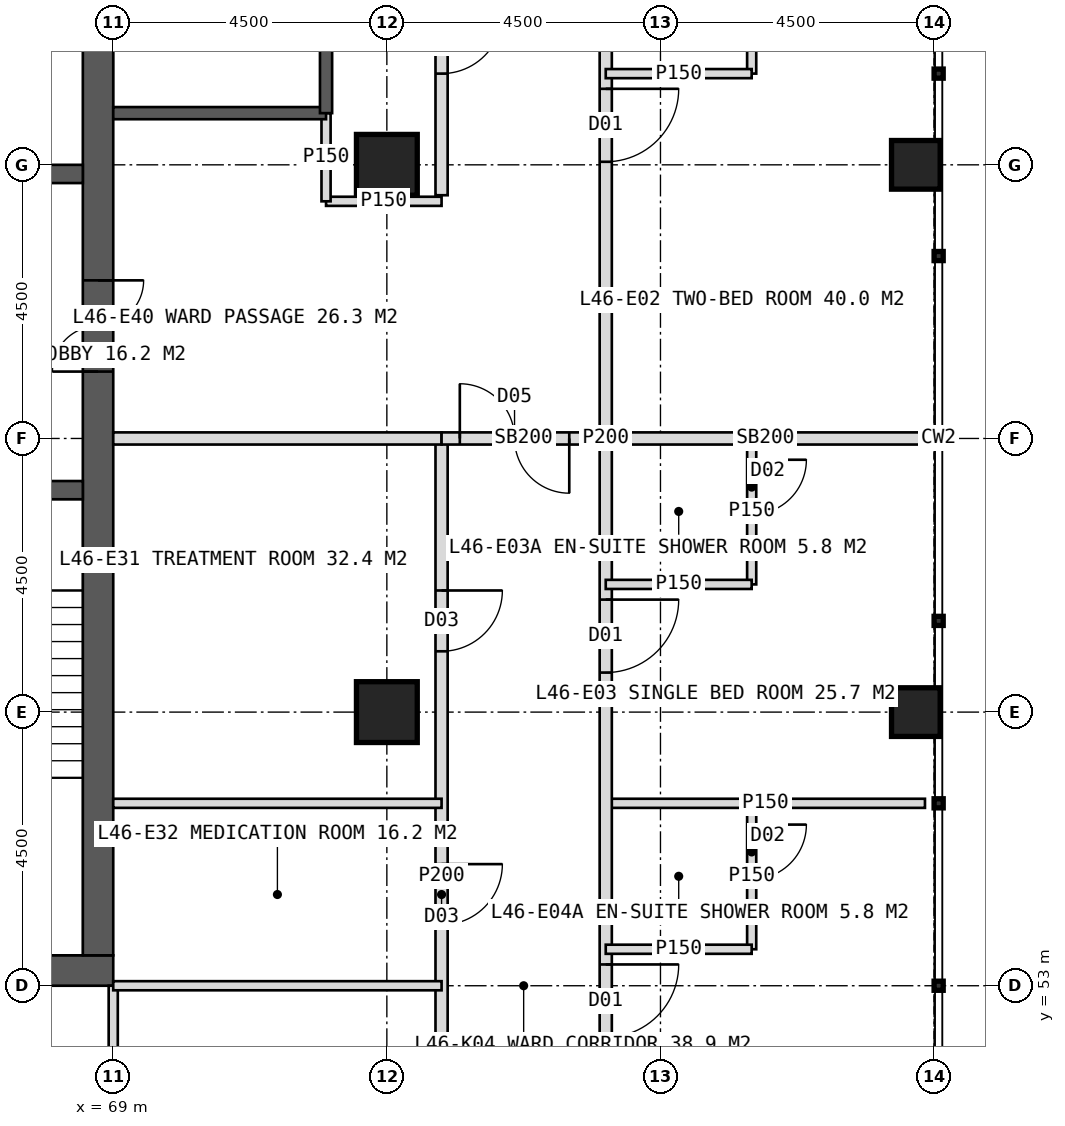
"""IFC4 building model, lengths in metres.
Left out: names, types, materials, properties, quantities, classifications, styles, units other than length and angle.
Written with IfcOpenShell. Run it as: python <this file> out.ifc"""

import sys

from ifc_helpers import new_model, si_unit, direction, frame, frame_2d, origin, origin_2d, place, context, subcontext, project, spatial, rectangle, hollow_rectangle, extrude, element, fill, save


model = new_model("IFC4")
c1 = context("Model", 3, precision=1e-05, world=origin(), true_north=direction((0.0, 1.0)))
c2 = subcontext(c1, "Body", "Model", "MODEL_VIEW")
j1 = project(units=[si_unit("LENGTHUNIT", "METRE"), si_unit("PLANEANGLEUNIT", "RADIAN")], contexts=[c1])
p1 = place(None, origin())
s1 = spatial("IfcSite", under=j1, at=p1, CompositionType="ELEMENT")
p2 = place(p1, origin())
s2 = spatial("IfcBuilding", under=s1, at=p2, CompositionType="ELEMENT")
p3 = place(p2, frame((0.0, 0.0, 193.0)))
s3 = spatial("IfcBuildingStorey", under=s2, at=p3, CompositionType="ELEMENT", Elevation=193.0)
p4 = place(p3, frame((51.0, 53.25, 0.0), z_axis=(0.0, 0.0, 1.0), x_axis=(1.0, 0.0, 0.0)))
e1 = element("IfcWall", 1, at=p4, inside=s3, PredefinedType="SHEAR", context=c2, shape_type="SweptSolid", body=[
    extrude(rectangle(XDim=18.0, YDim=0.5, at=frame_2d((9.0, 0.0))), origin(), (0.0, 0.0, 1.0), 4.0),
])
p5 = place(p4, frame((8.1, 0.0, 0.0)))
e2 = element("IfcOpeningElement", 2, at=p5, cuts=e1, PredefinedType="OPENING", context=c2, shape_type="SweptSolid", body=[
    extrude(rectangle(XDim=1.8, YDim=2.2, at=frame_2d((0.9, 1.1))), frame((0.0, 0.26, 0.0), z_axis=(0.0, -1.0, 0.0), x_axis=(1.0, 0.0, 0.0)), (0.0, 0.0, 1.0), 0.52),
])
p6 = place(p3, frame((68.75, 53.5, 0.0), z_axis=(0.0, 0.0, 1.0), x_axis=(0.0, 1.0, 0.0)))
e3 = element("IfcWall", 3, at=p6, inside=s3, PredefinedType="SHEAR", context=c2, shape_type="SweptSolid", body=[
    extrude(rectangle(XDim=17.0, YDim=0.5, at=frame_2d((8.5, 0.0))), origin(), (0.0, 0.0, 1.0), 4.0),
])
p7 = place(p6, frame((9.6, 0.0, 0.0)))
e4 = element("IfcOpeningElement", 4, at=p7, cuts=e3, PredefinedType="OPENING", context=c2, shape_type="SweptSolid", body=[
    extrude(rectangle(XDim=1.5, YDim=2.2, at=frame_2d((0.75, 1.1))), frame((0.0, 0.26, 0.0), z_axis=(0.0, -1.0, 0.0), x_axis=(1.0, 0.0, 0.0)), (0.0, 0.0, 1.0), 0.52),
])
p8 = place(p3, frame((65.2, 61.15, 0.0), z_axis=(0.0, 0.0, 1.0), x_axis=(1.0, 0.0, 0.0)))
e5 = element("IfcWall", 5, at=p8, inside=s3, PredefinedType="SHEAR", context=c2, shape_type="SweptSolid", body=[
    extrude(rectangle(XDim=3.3, YDim=0.3, at=frame_2d((1.65, 0.0))), origin(), (0.0, 0.0, 1.0), 4.0),
])
p9 = place(p8, frame((1.05, 0.0, 0.0)))
e6 = element("IfcOpeningElement", 6, at=p9, cuts=e5, PredefinedType="OPENING", context=c2, shape_type="SweptSolid", body=[
    extrude(rectangle(XDim=1.2, YDim=2.1, at=frame_2d((0.6, 1.05))), frame((0.0, 0.16, 0.0), z_axis=(0.0, -1.0, 0.0), x_axis=(1.0, 0.0, 0.0)), (0.0, 0.0, 1.0), 0.32),
])
p10 = place(p3, frame((65.2, 66.35, 0.0), z_axis=(0.0, 0.0, 1.0), x_axis=(1.0, 0.0, 0.0)))
e7 = element("IfcWall", 7, at=p10, inside=s3, PredefinedType="SHEAR", context=c2, shape_type="SweptSolid", body=[
    extrude(rectangle(XDim=3.3, YDim=0.3, at=frame_2d((1.65, 0.0))), origin(), (0.0, 0.0, 1.0), 4.0),
])
p11 = place(p10, frame((1.05, 0.0, 0.0)))
e8 = element("IfcOpeningElement", 8, at=p11, cuts=e7, PredefinedType="OPENING", context=c2, shape_type="SweptSolid", body=[
    extrude(rectangle(XDim=1.2, YDim=2.2, at=frame_2d((0.6, 1.1))), frame((0.0, 0.16, 0.0), z_axis=(0.0, -1.0, 0.0), x_axis=(1.0, 0.0, 0.0)), (0.0, 0.0, 1.0), 0.32),
])
for number, where, z_axis, x_axis in (
    (9, (73.5, 57.5, 0.0), (0.0, 0.0, 1.0), (1.0, 0.0, 0.0)),
    (10, (73.5, 66.5, 0.0), (0.0, 0.0, 1.0), (1.0, 0.0, 0.0)),
):
    element("IfcColumn", number, at=place(p3, frame(where, z_axis=z_axis, x_axis=x_axis)), inside=s3, PredefinedType="COLUMN", context=c2, shape_type="SweptSolid", body=[
        extrude(hollow_rectangle(XDim=1.0, YDim=1.0, WallThickness=0.1, at=origin_2d()), origin(), (0.0, 0.0, 1.0), 4.0),
    ])
for number, where, z_axis, x_axis in (
    (11, (82.2, 57.5, 0.0), (0.0, 0.0, 1.0), (1.0, 0.0, 0.0)),
    (12, (82.2, 66.5, 0.0), (0.0, 0.0, 1.0), (1.0, 0.0, 0.0)),
):
    element("IfcColumn", number, at=place(p3, frame(where, z_axis=z_axis, x_axis=x_axis)), inside=s3, PredefinedType="COLUMN", context=c2, shape_type="SweptSolid", body=[
        extrude(hollow_rectangle(XDim=0.8, YDim=0.8, WallThickness=0.08, at=origin_2d()), origin(), (0.0, 0.0, 1.0), 4.0),
    ])
p12 = place(p3, frame((69.0, 53.0, 0.0), z_axis=(0.0, 0.0, 1.0), x_axis=(0.0, -1.0, 0.0)))
e13 = element("IfcWall", 13, at=p12, inside=s3, PredefinedType="PARTITIONING", context=c2, shape_type="SweptSolid", body=[
    extrude(rectangle(XDim=5.4, YDim=0.15, at=frame_2d((2.7, 0.0))), origin(), (0.0, 0.0, 1.0), 3.75),
])
p13 = place(p3, frame((77.1, 62.0, 0.0), z_axis=(0.0, 0.0, 1.0), x_axis=(1.0, 0.0, 0.0)))
e14 = element("IfcWall", 14, at=p13, inside=s3, PredefinedType="SOLIDWALL", context=c2, shape_type="SweptSolid", body=[
    extrude(rectangle(XDim=5.25, YDim=0.2, at=frame_2d((2.625, 0.0))), origin(), (0.0, 0.0, 1.0), 2.95),
])
p14 = place(p3, frame((77.1, 56.0, 0.0), z_axis=(0.0, 0.0, 1.0), x_axis=(1.0, 0.0, 0.0)))
e15 = element("IfcWall", 15, at=p14, inside=s3, PredefinedType="PARTITIONING", context=c2, shape_type="SweptSolid", body=[
    extrude(rectangle(XDim=5.25, YDim=0.15, at=frame_2d((2.625, 0.0))), origin(), (0.0, 0.0, 1.0), 3.75),
])
p15 = place(p3, frame((77.1, 79.1, 0.0), z_axis=(0.0, 0.0, 1.0), x_axis=(0.0, -1.0, 0.0)))
e16 = element("IfcWall", 16, at=p15, inside=s3, PredefinedType="PARTITIONING", context=c2, shape_type="SweptSolid", body=[
    extrude(rectangle(XDim=34.2, YDim=0.2, at=frame_2d((17.1, 0.0))), origin(), (0.0, 0.0, 1.0), 3.75),
])
p16 = place(p15, frame((3.25, 0.0, 0.0)))
e17 = element("IfcOpeningElement", 17, at=p16, cuts=e16, PredefinedType="OPENING", context=c2, shape_type="SweptSolid", body=[
    extrude(rectangle(XDim=1.2, YDim=2.2, at=frame_2d((0.6, 1.1))), frame((0.0, 0.11, 0.0), z_axis=(0.0, -1.0, 0.0), x_axis=(1.0, 0.0, 0.0)), (0.0, 0.0, 1.0), 0.22),
])
p17 = place(p15, frame((11.35, 0.0, 0.0)))
e18 = element("IfcOpeningElement", 18, at=p17, cuts=e16, PredefinedType="OPENING", context=c2, shape_type="SweptSolid", body=[
    extrude(rectangle(XDim=1.2, YDim=2.2, at=frame_2d((0.6, 1.1))), frame((0.0, 0.11, 0.0), z_axis=(0.0, -1.0, 0.0), x_axis=(1.0, 0.0, 0.0)), (0.0, 0.0, 1.0), 0.22),
])
p18 = place(p15, frame((19.75, 0.0, 0.0)))
e19 = element("IfcOpeningElement", 19, at=p18, cuts=e16, PredefinedType="OPENING", context=c2, shape_type="SweptSolid", body=[
    extrude(rectangle(XDim=1.2, YDim=2.2, at=frame_2d((0.6, 1.1))), frame((0.0, 0.11, 0.0), z_axis=(0.0, -1.0, 0.0), x_axis=(1.0, 0.0, 0.0)), (0.0, 0.0, 1.0), 0.22),
])
p19 = place(p15, frame((25.75, 0.0, 0.0)))
e20 = element("IfcOpeningElement", 20, at=p19, cuts=e16, PredefinedType="OPENING", context=c2, shape_type="SweptSolid", body=[
    extrude(rectangle(XDim=1.2, YDim=2.2, at=frame_2d((0.6, 1.1))), frame((0.0, 0.11, 0.0), z_axis=(0.0, -1.0, 0.0), x_axis=(1.0, 0.0, 0.0)), (0.0, 0.0, 1.0), 0.22),
])
p20 = place(p3, frame((79.5, 71.0, 0.0), z_axis=(0.0, 0.0, 1.0), x_axis=(0.0, -1.0, 0.0)))
e21 = element("IfcWall", 21, at=p20, inside=s3, PredefinedType="PARTITIONING", context=c2, shape_type="SweptSolid", body=[
    extrude(rectangle(XDim=3.0, YDim=0.15, at=frame_2d((1.5, 0.0))), origin(), (0.0, 0.0, 1.0), 3.75),
])
p21 = place(p20, frame((0.35, 0.0, 0.0)))
e22 = element("IfcOpeningElement", 22, at=p21, cuts=e21, PredefinedType="OPENING", context=c2, shape_type="SweptSolid", body=[
    extrude(rectangle(XDim=0.9, YDim=2.1, at=frame_2d((0.45, 1.05))), frame((0.0, 0.085, 0.0), z_axis=(0.0, -1.0, 0.0), x_axis=(1.0, 0.0, 0.0)), (0.0, 0.0, 1.0), 0.17),
])
p22 = place(p3, frame((77.1, 68.0, 0.0), z_axis=(0.0, 0.0, 1.0), x_axis=(1.0, 0.0, 0.0)))
e23 = element("IfcWall", 23, at=p22, inside=s3, PredefinedType="PARTITIONING", context=c2, shape_type="SweptSolid", body=[
    extrude(rectangle(XDim=2.4, YDim=0.15, at=frame_2d((1.2, 0.0))), origin(), (0.0, 0.0, 1.0), 3.75),
])
p23 = place(p3, frame((79.5, 62.0, 0.0), z_axis=(0.0, 0.0, 1.0), x_axis=(0.0, -1.0, 0.0)))
e24 = element("IfcWall", 24, at=p23, inside=s3, PredefinedType="PARTITIONING", context=c2, shape_type="SweptSolid", body=[
    extrude(rectangle(XDim=2.4, YDim=0.15, at=frame_2d((1.2, 0.0))), origin(), (0.0, 0.0, 1.0), 3.75),
])
p24 = place(p23, frame((0.35, 0.0, 0.0)))
e25 = element("IfcOpeningElement", 25, at=p24, cuts=e24, PredefinedType="OPENING", context=c2, shape_type="SweptSolid", body=[
    extrude(rectangle(XDim=0.9, YDim=2.1, at=frame_2d((0.45, 1.05))), frame((0.0, 0.085, 0.0), z_axis=(0.0, -1.0, 0.0), x_axis=(1.0, 0.0, 0.0)), (0.0, 0.0, 1.0), 0.17),
])
p25 = place(p3, frame((77.1, 59.6, 0.0), z_axis=(0.0, 0.0, 1.0), x_axis=(1.0, 0.0, 0.0)))
e26 = element("IfcWall", 26, at=p25, inside=s3, PredefinedType="PARTITIONING", context=c2, shape_type="SweptSolid", body=[
    extrude(rectangle(XDim=2.4, YDim=0.15, at=frame_2d((1.2, 0.0))), origin(), (0.0, 0.0, 1.0), 3.75),
])
p26 = place(p3, frame((79.5, 56.0, 0.0), z_axis=(0.0, 0.0, 1.0), x_axis=(0.0, -1.0, 0.0)))
e27 = element("IfcWall", 27, at=p26, inside=s3, PredefinedType="PARTITIONING", context=c2, shape_type="SweptSolid", body=[
    extrude(rectangle(XDim=2.4, YDim=0.15, at=frame_2d((1.2, 0.0))), origin(), (0.0, 0.0, 1.0), 3.75),
])
p27 = place(p26, frame((0.35, 0.0, 0.0)))
e28 = element("IfcOpeningElement", 28, at=p27, cuts=e27, PredefinedType="OPENING", context=c2, shape_type="SweptSolid", body=[
    extrude(rectangle(XDim=0.9, YDim=2.1, at=frame_2d((0.45, 1.05))), frame((0.0, 0.085, 0.0), z_axis=(0.0, -1.0, 0.0), x_axis=(1.0, 0.0, 0.0)), (0.0, 0.0, 1.0), 0.17),
])
p28 = place(p3, frame((77.1, 53.6, 0.0), z_axis=(0.0, 0.0, 1.0), x_axis=(1.0, 0.0, 0.0)))
e29 = element("IfcWall", 29, at=p28, inside=s3, PredefinedType="PARTITIONING", context=c2, shape_type="SweptSolid", body=[
    extrude(rectangle(XDim=2.4, YDim=0.15, at=frame_2d((1.2, 0.0))), origin(), (0.0, 0.0, 1.0), 3.75),
])
p29 = place(p3, frame((74.4, 74.9, 0.0), z_axis=(0.0, 0.0, 1.0), x_axis=(0.0, -1.0, 0.0)))
e30 = element("IfcWall", 30, at=p29, inside=s3, PredefinedType="PARTITIONING", context=c2, shape_type="SweptSolid", body=[
    extrude(rectangle(XDim=8.9, YDim=0.2, at=frame_2d((4.45, 0.0))), origin(), (0.0, 0.0, 1.0), 3.75),
])
p30 = place(p29, frame((0.25, 0.0, 0.0)))
e31 = element("IfcOpeningElement", 31, at=p30, cuts=e30, PredefinedType="OPENING", context=c2, shape_type="SweptSolid", body=[
    extrude(rectangle(XDim=1.0, YDim=2.1, at=frame_2d((0.5, 1.05))), frame((0.0, 0.11, 0.0), z_axis=(0.0, -1.0, 0.0), x_axis=(1.0, 0.0, 0.0)), (0.0, 0.0, 1.0), 0.22),
])
p31 = place(p29, frame((5.9, 0.0, 0.0)))
e32 = element("IfcOpeningElement", 32, at=p31, cuts=e30, PredefinedType="OPENING", context=c2, shape_type="SweptSolid", body=[
    extrude(rectangle(XDim=1.0, YDim=2.1, at=frame_2d((0.5, 1.05))), frame((0.0, 0.11, 0.0), z_axis=(0.0, -1.0, 0.0), x_axis=(1.0, 0.0, 0.0)), (0.0, 0.0, 1.0), 0.22),
])
p32 = place(p3, frame((74.4, 62.0, 0.0), z_axis=(0.0, 0.0, 1.0), x_axis=(0.0, -1.0, 0.0)))
e33 = element("IfcWall", 33, at=p32, inside=s3, PredefinedType="PARTITIONING", context=c2, shape_type="SweptSolid", body=[
    extrude(rectangle(XDim=14.4, YDim=0.2, at=frame_2d((7.2, 0.0))), origin(), (0.0, 0.0, 1.0), 3.75),
])
p33 = place(p32, frame((2.5, 0.0, 0.0)))
e34 = element("IfcOpeningElement", 34, at=p33, cuts=e33, PredefinedType="OPENING", context=c2, shape_type="SweptSolid", body=[
    extrude(rectangle(XDim=1.0, YDim=2.1, at=frame_2d((0.5, 1.05))), frame((0.0, 0.11, 0.0), z_axis=(0.0, -1.0, 0.0), x_axis=(1.0, 0.0, 0.0)), (0.0, 0.0, 1.0), 0.22),
])
p34 = place(p32, frame((7.0, 0.0, 0.0)))
e35 = element("IfcOpeningElement", 35, at=p34, cuts=e33, PredefinedType="OPENING", context=c2, shape_type="SweptSolid", body=[
    extrude(rectangle(XDim=1.0, YDim=2.1, at=frame_2d((0.5, 1.05))), frame((0.0, 0.11, 0.0), z_axis=(0.0, -1.0, 0.0), x_axis=(1.0, 0.0, 0.0)), (0.0, 0.0, 1.0), 0.22),
])
p35 = place(p32, frame((11.2, 0.0, 0.0)))
e36 = element("IfcOpeningElement", 36, at=p35, cuts=e33, PredefinedType="OPENING", context=c2, shape_type="SweptSolid", body=[
    extrude(rectangle(XDim=1.0, YDim=2.1, at=frame_2d((0.5, 1.05))), frame((0.0, 0.11, 0.0), z_axis=(0.0, -1.0, 0.0), x_axis=(1.0, 0.0, 0.0)), (0.0, 0.0, 1.0), 0.22),
])
p36 = place(p3, frame((72.5, 65.9, 0.0), z_axis=(0.0, 0.0, 1.0), x_axis=(1.0, 0.0, 0.0)))
e37 = element("IfcWall", 37, at=p36, inside=s3, PredefinedType="PARTITIONING", context=c2, shape_type="SweptSolid", body=[
    extrude(rectangle(XDim=1.9, YDim=0.15, at=frame_2d((0.95, 0.0))), origin(), (0.0, 0.0, 1.0), 3.75),
])
p37 = place(p3, frame((69.0, 62.0, 0.0), z_axis=(0.0, 0.0, 1.0), x_axis=(1.0, 0.0, 0.0)))
e38 = element("IfcWall", 38, at=p37, inside=s3, PredefinedType="SOLIDWALL", context=c2, shape_type="SweptSolid", body=[
    extrude(rectangle(XDim=5.4, YDim=0.2, at=frame_2d((2.7, 0.0))), origin(), (0.0, 0.0, 1.0), 2.95),
])
for number, where, z_axis, x_axis in (
    (39, (69.0, 56.0, 0.0), (0.0, 0.0, 1.0), (1.0, 0.0, 0.0)),
    (40, (69.0, 53.0, 0.0), (0.0, 0.0, 1.0), (1.0, 0.0, 0.0)),
):
    element("IfcWall", number, at=place(p3, frame(where, z_axis=z_axis, x_axis=x_axis)), inside=s3, PredefinedType="PARTITIONING", context=c2, shape_type="SweptSolid", body=[
        extrude(rectangle(XDim=5.4, YDim=0.15, at=frame_2d((2.7, 0.0))), origin(), (0.0, 0.0, 1.0), 3.75),
    ])
p38 = place(p3, frame((74.4, 62.0, 0.0), z_axis=(0.0, 0.0, 1.0), x_axis=(1.0, 0.0, 0.0)))
e41 = element("IfcWall", 41, at=p38, inside=s3, PredefinedType="SOLIDWALL", context=c2, shape_type="SweptSolid", body=[
    extrude(rectangle(XDim=2.7, YDim=0.2, at=frame_2d((1.35, 0.0))), origin(), (0.0, 0.0, 1.0), 2.95),
])
p39 = place(p38, frame((0.3, 0.0, 0.0)))
e42 = element("IfcOpeningElement", 42, at=p39, cuts=e41, PredefinedType="OPENING", context=c2, shape_type="SweptSolid", body=[
    extrude(rectangle(XDim=1.8, YDim=2.2, at=frame_2d((0.9, 1.1))), frame((0.0, 0.11, 0.0), z_axis=(0.0, -1.0, 0.0), x_axis=(1.0, 0.0, 0.0)), (0.0, 0.0, 1.0), 0.22),
])
p40 = place(p3, frame((72.5, 65.9, 0.0), z_axis=(0.0, 0.0, 1.0), x_axis=(0.0, 1.0, 0.0)))
e43 = element("IfcWall", 43, at=p40, inside=s3, PredefinedType="PARTITIONING", context=c2, shape_type="SweptSolid", body=[
    extrude(rectangle(XDim=1.45, YDim=0.15, at=frame_2d((0.725, 0.0))), origin(), (0.0, 0.0, 1.0), 3.75),
])
p41 = place(p3, frame((69.0, 67.35, 0.0), z_axis=(0.0, 0.0, 1.0), x_axis=(1.0, 0.0, 0.0)))
e44 = element("IfcWall", 44, at=p41, inside=s3, PredefinedType="SOLIDWALL", context=c2, shape_type="SweptSolid", body=[
    extrude(rectangle(XDim=3.5, YDim=0.2, at=frame_2d((1.75, 0.0))), origin(), (0.0, 0.0, 1.0), 3.75),
])
p42 = place(p3, frame((72.5, 67.35, 0.0), z_axis=(0.0, 0.0, 1.0), x_axis=(0.0, 1.0, 0.0)))
e45 = element("IfcWall", 45, at=p42, inside=s3, PredefinedType="SOLIDWALL", context=c2, shape_type="SweptSolid", body=[
    extrude(rectangle(XDim=7.75, YDim=0.2, at=frame_2d((3.875, 0.0))), origin(), (0.0, 0.0, 1.0), 3.75),
])
p43 = place(p17, origin())
e46 = element("IfcDoor", 46, at=p43, inside=s3, OperationType="SINGLE_SWING_LEFT", PredefinedType="DOOR", context=c2, shape_type="SweptSolid", body=[
    extrude(rectangle(XDim=1.2, YDim=2.2, at=frame_2d((0.6, 1.1))), frame((0.0, 0.025, 0.0), z_axis=(0.0, -1.0, 0.0), x_axis=(1.0, 0.0, 0.0)), (0.0, 0.0, 1.0), 0.05),
])
fill(e18, e46)
p44 = place(p18, origin())
e47 = element("IfcDoor", 47, at=p44, inside=s3, OperationType="SINGLE_SWING_LEFT", PredefinedType="DOOR", context=c2, shape_type="SweptSolid", body=[
    extrude(rectangle(XDim=1.2, YDim=2.2, at=frame_2d((0.6, 1.1))), frame((0.0, 0.025, 0.0), z_axis=(0.0, -1.0, 0.0), x_axis=(1.0, 0.0, 0.0)), (0.0, 0.0, 1.0), 0.05),
])
fill(e19, e47)
p45 = place(p24, origin())
e48 = element("IfcDoor", 48, at=p45, inside=s3, OperationType="SINGLE_SWING_LEFT", PredefinedType="DOOR", context=c2, shape_type="SweptSolid", body=[
    extrude(rectangle(XDim=0.9, YDim=2.1, at=frame_2d((0.45, 1.05))), frame((0.0, 0.025, 0.0), z_axis=(0.0, -1.0, 0.0), x_axis=(1.0, 0.0, 0.0)), (0.0, 0.0, 1.0), 0.05),
])
fill(e25, e48)
p46 = place(p19, origin())
e49 = element("IfcDoor", 49, at=p46, inside=s3, OperationType="SINGLE_SWING_LEFT", PredefinedType="DOOR", context=c2, shape_type="SweptSolid", body=[
    extrude(rectangle(XDim=1.2, YDim=2.2, at=frame_2d((0.6, 1.1))), frame((0.0, 0.025, 0.0), z_axis=(0.0, -1.0, 0.0), x_axis=(1.0, 0.0, 0.0)), (0.0, 0.0, 1.0), 0.05),
])
fill(e20, e49)
p47 = place(p27, origin())
e50 = element("IfcDoor", 50, at=p47, inside=s3, OperationType="SINGLE_SWING_LEFT", PredefinedType="DOOR", context=c2, shape_type="SweptSolid", body=[
    extrude(rectangle(XDim=0.9, YDim=2.1, at=frame_2d((0.45, 1.05))), frame((0.0, 0.025, 0.0), z_axis=(0.0, -1.0, 0.0), x_axis=(1.0, 0.0, 0.0)), (0.0, 0.0, 1.0), 0.05),
])
fill(e28, e50)
p48 = place(p31, origin())
e51 = element("IfcDoor", 51, at=p48, inside=s3, OperationType="SINGLE_SWING_LEFT", PredefinedType="DOOR", context=c2, shape_type="SweptSolid", body=[
    extrude(rectangle(XDim=1.0, YDim=2.1, at=frame_2d((0.5, 1.05))), frame((0.0, 0.025, 0.0), z_axis=(0.0, -1.0, 0.0), x_axis=(1.0, 0.0, 0.0)), (0.0, 0.0, 1.0), 0.05),
])
fill(e32, e51)
p49 = place(p33, origin())
e52 = element("IfcDoor", 52, at=p49, inside=s3, OperationType="SINGLE_SWING_LEFT", PredefinedType="DOOR", context=c2, shape_type="SweptSolid", body=[
    extrude(rectangle(XDim=1.0, YDim=2.1, at=frame_2d((0.5, 1.05))), frame((0.0, 0.025, 0.0), z_axis=(0.0, -1.0, 0.0), x_axis=(1.0, 0.0, 0.0)), (0.0, 0.0, 1.0), 0.05),
])
fill(e34, e52)
p50 = place(p34, origin())
e53 = element("IfcDoor", 53, at=p50, inside=s3, OperationType="SINGLE_SWING_LEFT", PredefinedType="DOOR", context=c2, shape_type="SweptSolid", body=[
    extrude(rectangle(XDim=1.0, YDim=2.1, at=frame_2d((0.5, 1.05))), frame((0.0, 0.025, 0.0), z_axis=(0.0, -1.0, 0.0), x_axis=(1.0, 0.0, 0.0)), (0.0, 0.0, 1.0), 0.05),
])
fill(e35, e53)
p51 = place(p39, origin())
e54 = element("IfcDoor", 54, at=p51, inside=s3, OperationType="DOUBLE_DOOR_DOUBLE_SWING", PredefinedType="DOOR", context=c2, shape_type="SweptSolid", body=[
    extrude(rectangle(XDim=1.8, YDim=2.2, at=frame_2d((0.9, 1.1))), frame((0.0, 0.025, 0.0), z_axis=(0.0, -1.0, 0.0), x_axis=(1.0, 0.0, 0.0)), (0.0, 0.0, 1.0), 0.05),
])
fill(e42, e54)
p52 = place(p7, origin())
e55 = element("IfcDoor", 55, at=p52, inside=s3, OperationType="DOUBLE_DOOR_SINGLE_SWING", PredefinedType="DOOR", context=c2, shape_type="SweptSolid", body=[
    extrude(rectangle(XDim=1.5, YDim=2.2, at=frame_2d((0.75, 1.1))), frame((0.0, 0.025, 0.0), z_axis=(0.0, -1.0, 0.0), x_axis=(1.0, 0.0, 0.0)), (0.0, 0.0, 1.0), 0.05),
])
fill(e4, e55)
save(model, sys.argv[1])
